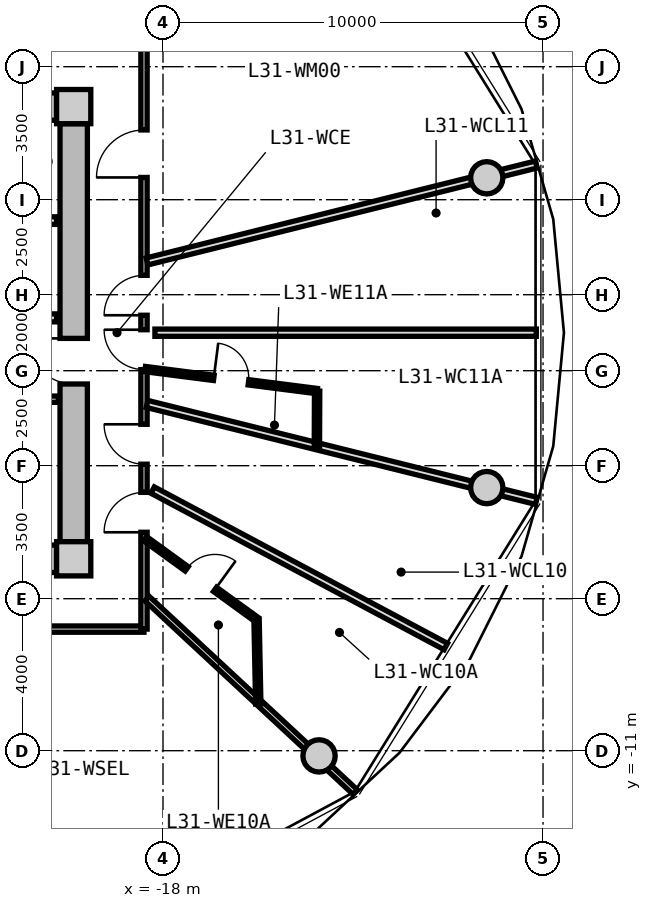
"""IFC4 building model, lengths in metres.
Left out: names, types, materials, properties, quantities, classifications, styles, units other than length and angle.
Written with IfcOpenShell. Run it as: python <this file> out.ifc"""

import sys

from ifc_helpers import new_model, si_unit, direction, frame, frame_2d, origin, origin_2d, place, context, subcontext, project, spatial, rectangle, circle, extrude, source, transform, mapped, element, fill, save


model = new_model("IFC4")
c1 = context("Model", 3, precision=1e-05, world=origin(), true_north=direction((0.0, 1.0)))
c2 = subcontext(c1, "Body", "Model", "MODEL_VIEW")
j1 = project(units=[si_unit("LENGTHUNIT", "METRE"), si_unit("PLANEANGLEUNIT", "RADIAN")], contexts=[c1])
p1 = place(None, origin())
s1 = spatial("IfcSite", under=j1, at=p1, CompositionType="ELEMENT")
p2 = place(p1, origin())
s2 = spatial("IfcBuilding", under=s1, at=p2, CompositionType="ELEMENT")
p3 = place(p2, frame((0.0, 0.0, 102.35)))
s3 = spatial("IfcBuildingStorey", under=s2, at=p3, CompositionType="ELEMENT", Elevation=102.35)
m1 = source(origin(), c2, "Body", "SweptSolid", [
    extrude(rectangle(XDim=0.9, YDim=0.9, at=origin_2d()), origin(), (0.0, 0.0, 1.0), 3.05),
])
for number, where, z_axis, x_axis in (
    (1, (-20.35, -5.95, 0.0), (0.0, 0.0, 1.0), (1.0, 0.0, 0.0)),
    (2, (-20.35, 5.95, 0.0), (0.0, 0.0, 1.0), (1.0, 0.0, 0.0)),
):
    element("IfcColumn", number, at=place(p3, frame(where, z_axis=z_axis, x_axis=x_axis)), inside=s3, PredefinedType="COLUMN", context=c2, shape_type="MappedRepresentation", body=[
        mapped(m1, transform((0.0, 0.0, 0.0), x_axis=(1.0, 0.0, 0.0), y_axis=(0.0, 1.0, 0.0), z_axis=(0.0, 0.0, 1.0), scale=1.0)),
    ])
m2 = source(origin(), c2, "Body", "SweptSolid", [
    extrude(rectangle(XDim=14.4, YDim=0.72, at=frame_2d((7.2, 0.0))), origin(), (0.0, 0.0, 1.0), 2.79),
])
for number, where, z_axis, x_axis in (
    (3, (-35.2, 5.95, 0.0), (0.0, 0.0, 1.0), (1.0, 0.0, 0.0)),
    (4, (-20.8, -5.95, 0.0), (0.0, 0.0, 1.0), (-1.0, 0.0, 0.0)),
):
    element("IfcWall", number, at=place(p3, frame(where, z_axis=z_axis, x_axis=x_axis)), inside=s3, PredefinedType="SHEAR", context=c2, shape_type="MappedRepresentation", body=[
        mapped(m2, transform((0.0, 0.0, 0.0), x_axis=(1.0, 0.0, 0.0), y_axis=(0.0, 1.0, 0.0), z_axis=(0.0, 0.0, 1.0), scale=1.0)),
    ])
m3 = source(origin(), c2, "Body", "SweptSolid", [
    extrude(rectangle(XDim=11.0, YDim=0.72, at=frame_2d((5.5, 0.0))), origin(), (0.0, 0.0, 1.0), 2.79),
])
p4 = place(p3, frame((-20.35, 5.5, 0.0), z_axis=(0.0, 0.0, 1.0), x_axis=(0.0, -1.0, 0.0)))
e5 = element("IfcWall", 5, at=p4, inside=s3, PredefinedType="SHEAR", context=c2, shape_type="MappedRepresentation", body=[
    mapped(m3, transform((0.0, 0.0, 0.0), x_axis=(1.0, 0.0, 0.0), y_axis=(0.0, 1.0, 0.0), z_axis=(0.0, 0.0, 1.0), scale=1.0)),
])
p5 = place(p4, frame((5.65, 0.0, 0.0)))
e6 = element("IfcOpeningElement", 6, at=p5, cuts=e5, PredefinedType="OPENING", context=c2, shape_type="SweptSolid", body=[
    extrude(rectangle(XDim=1.2, YDim=2.15, at=frame_2d((0.6, 1.075))), frame((0.0, 0.37, 0.0), z_axis=(0.0, -1.0, 0.0), x_axis=(1.0, 0.0, 0.0)), (0.0, 0.0, 1.0), 0.74),
])
m4 = source(origin(), c2, "Body", "SweptSolid", [
    extrude(circle(Radius=0.425, at=origin_2d()), origin(), (0.0, 0.0, 1.0), 3.05),
])
for number, where, z_axis, x_axis in (
    (7, (-9.481, 4.076, 0.0), (0.0, 0.0, 1.0), (1.0, 0.0, 0.0)),
    (8, (-13.894, -11.137, 0.0), (0.0, 0.0, 1.0), (1.0, 0.0, 0.0)),
    (9, (-9.481, -4.076, 0.0), (0.0, 0.0, 1.0), (1.0, 0.0, 0.0)),
):
    element("IfcColumn", number, at=place(p3, frame(where, z_axis=z_axis, x_axis=x_axis)), inside=s3, PredefinedType="COLUMN", context=c2, shape_type="MappedRepresentation", body=[
        mapped(m4, transform((0.0, 0.0, 0.0), x_axis=(1.0, 0.0, 0.0), y_axis=(0.0, 1.0, 0.0), z_axis=(0.0, 0.0, 1.0), scale=1.0)),
    ])
m5 = source(origin(), c2, "Body", "SweptSolid", [
    extrude(rectangle(XDim=3.2, YDim=0.2, at=frame_2d((1.6, 0.0))), origin(), (0.0, 0.0, 1.0), 2.775),
])
p6 = place(p3, frame((-24.0, 2.95, 0.0), z_axis=(0.0, 0.0, 1.0), x_axis=(1.0, 0.0, 0.0)))
e10 = element("IfcWall", 10, at=p6, inside=s3, PredefinedType="PARTITIONING", context=c2, shape_type="MappedRepresentation", body=[
    mapped(m5, transform((0.0, 0.0, 0.0), x_axis=(1.0, 0.0, 0.0), y_axis=(0.0, 1.0, 0.0), z_axis=(0.0, 0.0, 1.0), scale=1.0)),
])
m6 = source(origin(), c2, "Body", "SweptSolid", [
    extrude(rectangle(XDim=6.66, YDim=0.21, at=frame_2d((3.33, 0.0))), origin(), (0.0, 0.0, 1.0), 2.775),
])
p7 = place(p3, frame((-27.46, 0.39, 0.0), z_axis=(0.0, 0.0, 1.0), x_axis=(1.0, 0.0, 0.0)))
e11 = element("IfcWall", 11, at=p7, inside=s3, PredefinedType="PARTITIONING", context=c2, shape_type="MappedRepresentation", body=[
    mapped(m6, transform((0.0, 0.0, 0.0), x_axis=(1.0, 0.0, 0.0), y_axis=(0.0, 1.0, 0.0), z_axis=(0.0, 0.0, 1.0), scale=1.0)),
])
p8 = place(p7, frame((1.0, 0.0, 0.0)))
e12 = element("IfcOpeningElement", 12, at=p8, cuts=e11, PredefinedType="OPENING", context=c2, shape_type="SweptSolid", body=[
    extrude(rectangle(XDim=1.2, YDim=2.15, at=frame_2d((0.6, 1.075))), frame((0.0, 0.115, 0.0), z_axis=(0.0, -1.0, 0.0), x_axis=(1.0, 0.0, 0.0)), (0.0, 0.0, 1.0), 0.23),
])
m7 = source(origin(), c2, "Body", "SweptSolid", [
    extrude(rectangle(XDim=2.7, YDim=0.165, at=frame_2d((1.35, 0.0))), origin(), (0.0, 0.0, 1.0), 2.775),
])
p9 = place(p3, frame((-23.45, -1.75, 0.0), z_axis=(0.0, 0.0, 1.0), x_axis=(1.0, 0.0, 0.0)))
e13 = element("IfcWall", 13, at=p9, inside=s3, PredefinedType="PARTITIONING", context=c2, shape_type="MappedRepresentation", body=[
    mapped(m7, transform((0.0, 0.0, 0.0), x_axis=(1.0, 0.0, 0.0), y_axis=(0.0, 1.0, 0.0), z_axis=(0.0, 0.0, 1.0), scale=1.0)),
])
p10 = place(p9, frame((0.85, 0.0, 0.0)))
e14 = element("IfcOpeningElement", 14, at=p10, cuts=e13, PredefinedType="OPENING", context=c2, shape_type="SweptSolid", body=[
    extrude(rectangle(XDim=0.925, YDim=2.1, at=frame_2d((0.462, 1.05))), frame((0.0, 0.093, 0.0), z_axis=(0.0, -1.0, 0.0), x_axis=(1.0, 0.0, 0.0)), (0.0, 0.0, 1.0), 0.185),
])
m8 = source(origin(), c2, "Body", "SweptSolid", [
    extrude(rectangle(XDim=8.6, YDim=0.165, at=frame_2d((4.3, 0.0))), origin(), (0.0, 0.0, 1.0), 2.775),
])
p11 = place(p3, frame((-18.5, -7.8, 0.0), z_axis=(0.0, 0.0, 1.0), x_axis=(-1.0, 0.0, 0.0)))
e15 = element("IfcWall", 15, at=p11, inside=s3, PredefinedType="PARTITIONING", context=c2, shape_type="MappedRepresentation", body=[
    mapped(m8, transform((0.0, 0.0, 0.0), x_axis=(1.0, 0.0, 0.0), y_axis=(0.0, 1.0, 0.0), z_axis=(0.0, 0.0, 1.0), scale=1.0)),
])
p12 = place(p11, frame((3.775, 0.0, 0.0)))
e16 = element("IfcOpeningElement", 16, at=p12, cuts=e15, PredefinedType="OPENING", context=c2, shape_type="SweptSolid", body=[
    extrude(rectangle(XDim=1.05, YDim=2.15, at=frame_2d((0.525, 1.075))), frame((0.0, 0.093, 0.0), z_axis=(0.0, -1.0, 0.0), x_axis=(1.0, 0.0, 0.0)), (0.0, 0.0, 1.0), 0.185),
])
m9 = source(origin(), c2, "Body", "SweptSolid", [
    extrude(rectangle(XDim=15.6, YDim=0.165, at=frame_2d((7.8, 0.0))), origin(), (0.0, 0.0, 1.0), 2.775),
])
p13 = place(p3, frame((-18.5, 7.8, 0.0), z_axis=(0.0, 0.0, 1.0), x_axis=(0.0, -1.0, 0.0)))
e17 = element("IfcWall", 17, at=p13, inside=s3, PredefinedType="PARTITIONING", context=c2, shape_type="MappedRepresentation", body=[
    mapped(m9, transform((0.0, 0.0, 0.0), x_axis=(1.0, 0.0, 0.0), y_axis=(0.0, 1.0, 0.0), z_axis=(0.0, 0.0, 1.0), scale=1.0)),
])
p14 = place(p13, frame((12.002, 0.0, 0.0)))
e18 = element("IfcOpeningElement", 18, at=p14, cuts=e17, PredefinedType="OPENING", context=c2, shape_type="SweptSolid", body=[
    extrude(rectangle(XDim=1.05, YDim=2.15, at=frame_2d((0.525, 1.075))), frame((0.0, 0.093, 0.0), z_axis=(0.0, -1.0, 0.0), x_axis=(1.0, 0.0, 0.0)), (0.0, 0.0, 1.0), 0.185),
])
p15 = place(p13, frame((10.211, 0.0, 0.0)))
e19 = element("IfcOpeningElement", 19, at=p15, cuts=e17, PredefinedType="OPENING", context=c2, shape_type="SweptSolid", body=[
    extrude(rectangle(XDim=1.05, YDim=2.15, at=frame_2d((0.525, 1.075))), frame((0.0, 0.093, 0.0), z_axis=(0.0, -1.0, 0.0), x_axis=(1.0, 0.0, 0.0)), (0.0, 0.0, 1.0), 0.185),
])
p16 = place(p13, frame((7.722, 0.0, 0.0)))
e20 = element("IfcOpeningElement", 20, at=p16, cuts=e17, PredefinedType="OPENING", context=c2, shape_type="SweptSolid", body=[
    extrude(rectangle(XDim=1.05, YDim=2.15, at=frame_2d((0.525, 1.075))), frame((0.0, 0.093, 0.0), z_axis=(0.0, -1.0, 0.0), x_axis=(1.0, 0.0, 0.0)), (0.0, 0.0, 1.0), 0.185),
])
p17 = place(p13, frame((6.291, 0.0, 0.0)))
e21 = element("IfcOpeningElement", 21, at=p17, cuts=e17, PredefinedType="OPENING", context=c2, shape_type="SweptSolid", body=[
    extrude(rectangle(XDim=1.05, YDim=2.15, at=frame_2d((0.525, 1.075))), frame((0.0, 0.093, 0.0), z_axis=(0.0, -1.0, 0.0), x_axis=(1.0, 0.0, 0.0)), (0.0, 0.0, 1.0), 0.185),
])
p18 = place(p13, frame((2.465, 0.0, 0.0)))
e22 = element("IfcOpeningElement", 22, at=p18, cuts=e17, PredefinedType="OPENING", context=c2, shape_type="SweptSolid", body=[
    extrude(rectangle(XDim=1.25, YDim=2.2, at=frame_2d((0.625, 1.1))), frame((0.0, 0.093, 0.0), z_axis=(0.0, -1.0, 0.0), x_axis=(1.0, 0.0, 0.0)), (0.0, 0.0, 1.0), 0.185),
])
m10 = source(origin(), c2, "Body", "SweptSolid", [
    extrude(rectangle(XDim=7.482, YDim=0.165, at=frame_2d((3.741, 0.0))), origin(), (0.0, 0.0, 1.0), 2.275),
])
p19 = place(p3, frame((-18.42, -6.998, 0.0), z_axis=(0.0, 0.0, 1.0), x_axis=(0.732508698043, -0.680757671489, 0.0)))
e23 = element("IfcWall", 23, at=p19, inside=s3, PredefinedType="PARTITIONING", context=c2, shape_type="MappedRepresentation", body=[
    mapped(m10, transform((0.0, 0.0, 0.0), x_axis=(1.0, 0.0, 0.0), y_axis=(0.0, 1.0, 0.0), z_axis=(0.0, 0.0, 1.0), scale=1.0)),
])
m11 = source(origin(), c2, "Body", "SweptSolid", [
    extrude(rectangle(XDim=10.556, YDim=0.19, at=frame_2d((5.278, 0.0))), origin(), (0.0, 0.0, 1.0), 2.275),
])
p20 = place(p3, frame((-18.42, -1.875, 0.0), z_axis=(0.0, 0.0, 1.0), x_axis=(0.970363857851, -0.241648470667, 0.0)))
e24 = element("IfcWall", 24, at=p20, inside=s3, PredefinedType="PARTITIONING", context=c2, shape_type="MappedRepresentation", body=[
    mapped(m11, transform((0.0, 0.0, 0.0), x_axis=(1.0, 0.0, 0.0), y_axis=(0.0, 1.0, 0.0), z_axis=(0.0, 0.0, 1.0), scale=1.0)),
])
m12 = source(origin(), c2, "Body", "SweptSolid", [
    extrude(rectangle(XDim=8.744, YDim=0.19, at=frame_2d((4.372, 0.0))), origin(), (0.0, 0.0, 1.0), 2.775),
])
p21 = place(p3, frame((-18.273, -4.142, 0.0), z_axis=(0.0, 0.0, 1.0), x_axis=(0.882252449936, -0.470776607938, 0.0)))
e25 = element("IfcWall", 25, at=p21, inside=s3, PredefinedType="PARTITIONING", context=c2, shape_type="MappedRepresentation", body=[
    mapped(m12, transform((0.0, 0.0, 0.0), x_axis=(1.0, 0.0, 0.0), y_axis=(0.0, 1.0, 0.0), z_axis=(0.0, 0.0, 1.0), scale=1.0)),
])
m13 = source(origin(), c2, "Body", "SweptSolid", [
    extrude(rectangle(XDim=3.621, YDim=0.14, at=frame_2d((1.811, 0.0))), origin(), (0.0, 0.0, 1.0), 2.775),
])
p22 = place(p3, frame((-18.47, -5.422, 0.0), z_axis=(0.0, 0.0, 1.0), x_axis=(0.80968252222, -0.586868139544, 0.0)))
e26 = element("IfcWall", 26, at=p22, inside=s3, PredefinedType="PARTITIONING", context=c2, shape_type="MappedRepresentation", body=[
    mapped(m13, transform((0.0, 0.0, 0.0), x_axis=(1.0, 0.0, 0.0), y_axis=(0.0, 1.0, 0.0), z_axis=(0.0, 0.0, 1.0), scale=1.0)),
])
p23 = place(p22, frame((1.351, 0.0, 0.0)))
e27 = element("IfcOpeningElement", 27, at=p23, cuts=e26, PredefinedType="OPENING", context=c2, shape_type="SweptSolid", body=[
    extrude(rectangle(XDim=0.92, YDim=2.1, at=frame_2d((0.46, 1.05))), frame((0.0, 0.08, 0.0), z_axis=(0.0, -1.0, 0.0), x_axis=(1.0, 0.0, 0.0)), (0.0, 0.0, 1.0), 0.16),
])
m14 = source(origin(), c2, "Body", "SweptSolid", [
    extrude(rectangle(XDim=2.225, YDim=0.14, at=frame_2d((1.112, 0.0))), origin(), (0.0, 0.0, 1.0), 2.775),
])
p24 = place(p3, frame((-15.538, -7.547, 0.0), z_axis=(0.0, 0.0, 1.0), x_axis=(0.019971869027, -0.999800542332, 0.0)))
e28 = element("IfcWall", 28, at=p24, inside=s3, PredefinedType="PARTITIONING", context=c2, shape_type="MappedRepresentation", body=[
    mapped(m14, transform((0.0, 0.0, 0.0), x_axis=(1.0, 0.0, 0.0), y_axis=(0.0, 1.0, 0.0), z_axis=(0.0, 0.0, 1.0), scale=1.0)),
])
p25 = place(p3, frame((-18.42, 1.875, 0.0), z_axis=(0.0, 0.0, 1.0), x_axis=(0.970363857851, 0.241648470667, 0.0)))
e29 = element("IfcWall", 29, at=p25, inside=s3, PredefinedType="PARTITIONING", context=c2, shape_type="MappedRepresentation", body=[
    mapped(m11, transform((0.0, 0.0, 0.0), x_axis=(1.0, 0.0, 0.0), y_axis=(0.0, 1.0, 0.0), z_axis=(0.0, 0.0, 1.0), scale=1.0)),
])
m15 = source(origin(), c2, "Body", "SweptSolid", [
    extrude(rectangle(XDim=10.036, YDim=0.19, at=frame_2d((5.018, 0.0))), origin(), (0.0, 0.0, 1.0), 2.775),
])
p26 = place(p3, frame((-18.213, 0.0, 0.0), z_axis=(0.0, 0.0, 1.0), x_axis=(1.0, 0.0, 0.0)))
e30 = element("IfcWall", 30, at=p26, inside=s3, PredefinedType="PARTITIONING", context=c2, shape_type="MappedRepresentation", body=[
    mapped(m15, transform((0.0, 0.0, 0.0), x_axis=(1.0, 0.0, 0.0), y_axis=(0.0, 1.0, 0.0), z_axis=(0.0, 0.0, 1.0), scale=1.0)),
])
m16 = source(origin(), c2, "Body", "SweptSolid", [
    extrude(rectangle(XDim=4.562, YDim=0.14, at=frame_2d((2.281, 0.0))), origin(), (0.0, 0.0, 1.0), 2.775),
])
p27 = place(p3, frame((-18.47, -0.958, 0.0), z_axis=(0.0, 0.0, 1.0), x_axis=(0.991904666356, -0.126984774129, 0.0)))
e31 = element("IfcWall", 31, at=p27, inside=s3, PredefinedType="PARTITIONING", context=c2, shape_type="MappedRepresentation", body=[
    mapped(m16, transform((0.0, 0.0, 0.0), x_axis=(1.0, 0.0, 0.0), y_axis=(0.0, 1.0, 0.0), z_axis=(0.0, 0.0, 1.0), scale=1.0)),
])
p28 = place(p27, frame((1.821, 0.0, 0.0)))
e32 = element("IfcOpeningElement", 32, at=p28, cuts=e31, PredefinedType="OPENING", context=c2, shape_type="SweptSolid", body=[
    extrude(rectangle(XDim=0.92, YDim=2.1, at=frame_2d((0.46, 1.05))), frame((0.0, 0.08, 0.0), z_axis=(0.0, -1.0, 0.0), x_axis=(1.0, 0.0, 0.0)), (0.0, 0.0, 1.0), 0.16),
])
m17 = source(origin(), c2, "Body", "SweptSolid", [
    extrude(rectangle(XDim=1.468, YDim=0.14, at=frame_2d((0.734, 0.0))), origin(), (0.0, 0.0, 1.0), 2.775),
])
p29 = place(p3, frame((-13.945, -1.537, 0.0), z_axis=(0.0, 0.0, 1.0), x_axis=(-0.00399198416, -0.999992031999, 0.0)))
e33 = element("IfcWall", 33, at=p29, inside=s3, PredefinedType="PARTITIONING", context=c2, shape_type="MappedRepresentation", body=[
    mapped(m17, transform((0.0, 0.0, 0.0), x_axis=(1.0, 0.0, 0.0), y_axis=(0.0, 1.0, 0.0), z_axis=(0.0, 0.0, 1.0), scale=1.0)),
])
m18 = source(origin(), c2, "Body", "SweptSolid", [
    extrude(rectangle(XDim=1.2, YDim=2.15, at=frame_2d((0.6, 1.075))), frame((0.0, 0.025, 0.0), z_axis=(0.0, -1.0, 0.0), x_axis=(1.0, 0.0, 0.0)), (0.0, 0.0, 1.0), 0.05),
])
p30 = place(p5, frame((1.2, 0.0, 0.0), z_axis=(0.0, 0.0, 1.0), x_axis=(-1.0, 0.0, 0.0)))
e34 = element("IfcDoor", 34, at=p30, inside=s3, OperationType="SINGLE_SWING_RIGHT", PredefinedType="DOOR", context=c2, shape_type="MappedRepresentation", body=[
    mapped(m18, transform((0.0, 0.0, 0.0), x_axis=(1.0, 0.0, 0.0), y_axis=(0.0, 1.0, 0.0), z_axis=(0.0, 0.0, 1.0), scale=1.0)),
])
fill(e6, e34)
m19 = source(origin(), c2, "Body", "SweptSolid", [
    extrude(rectangle(XDim=1.05, YDim=2.15, at=frame_2d((0.525, 1.075))), frame((0.0, 0.025, 0.0), z_axis=(0.0, -1.0, 0.0), x_axis=(1.0, 0.0, 0.0)), (0.0, 0.0, 1.0), 0.05),
])
p31 = place(p14, frame((1.05, 0.0, 0.0), z_axis=(0.0, 0.0, 1.0), x_axis=(-1.0, 0.0, 0.0)))
e35 = element("IfcDoor", 35, at=p31, inside=s3, OperationType="SINGLE_SWING_LEFT", PredefinedType="DOOR", context=c2, shape_type="MappedRepresentation", body=[
    mapped(m19, transform((0.0, 0.0, 0.0), x_axis=(1.0, 0.0, 0.0), y_axis=(0.0, 1.0, 0.0), z_axis=(0.0, 0.0, 1.0), scale=1.0)),
])
fill(e18, e35)
m20 = source(origin(), c2, "Body", "SweptSolid", [
    extrude(rectangle(XDim=0.92, YDim=2.1, at=frame_2d((0.46, 1.05))), frame((0.0, 0.025, 0.0), z_axis=(0.0, -1.0, 0.0), x_axis=(1.0, 0.0, 0.0)), (0.0, 0.0, 1.0), 0.05),
])
p32 = place(p23, origin())
e36 = element("IfcDoor", 36, at=p32, inside=s3, OperationType="SINGLE_SWING_RIGHT", PredefinedType="DOOR", context=c2, shape_type="MappedRepresentation", body=[
    mapped(m20, transform((0.0, 0.0, 0.0), x_axis=(1.0, 0.0, 0.0), y_axis=(0.0, 1.0, 0.0), z_axis=(0.0, 0.0, 1.0), scale=1.0)),
])
fill(e27, e36)
p33 = place(p15, frame((1.05, 0.0, 0.0), z_axis=(0.0, 0.0, 1.0), x_axis=(-1.0, 0.0, 0.0)))
e37 = element("IfcDoor", 37, at=p33, inside=s3, OperationType="SINGLE_SWING_RIGHT", PredefinedType="DOOR", context=c2, shape_type="MappedRepresentation", body=[
    mapped(m19, transform((0.0, 0.0, 0.0), x_axis=(1.0, 0.0, 0.0), y_axis=(0.0, 1.0, 0.0), z_axis=(0.0, 0.0, 1.0), scale=1.0)),
])
fill(e19, e37)
p34 = place(p16, frame((1.05, 0.0, 0.0), z_axis=(0.0, 0.0, 1.0), x_axis=(-1.0, 0.0, 0.0)))
e38 = element("IfcDoor", 38, at=p34, inside=s3, OperationType="SINGLE_SWING_RIGHT", PredefinedType="DOOR", context=c2, shape_type="MappedRepresentation", body=[
    mapped(m19, transform((0.0, 0.0, 0.0), x_axis=(1.0, 0.0, 0.0), y_axis=(0.0, 1.0, 0.0), z_axis=(0.0, 0.0, 1.0), scale=1.0)),
])
fill(e20, e38)
p35 = place(p28, origin())
e39 = element("IfcDoor", 39, at=p35, inside=s3, OperationType="SINGLE_SWING_LEFT", PredefinedType="DOOR", context=c2, shape_type="MappedRepresentation", body=[
    mapped(m20, transform((0.0, 0.0, 0.0), x_axis=(1.0, 0.0, 0.0), y_axis=(0.0, 1.0, 0.0), z_axis=(0.0, 0.0, 1.0), scale=1.0)),
])
fill(e32, e39)
p36 = place(p17, frame((1.05, 0.0, 0.0), z_axis=(0.0, 0.0, 1.0), x_axis=(-1.0, 0.0, 0.0)))
e40 = element("IfcDoor", 40, at=p36, inside=s3, OperationType="SINGLE_SWING_LEFT", PredefinedType="DOOR", context=c2, shape_type="MappedRepresentation", body=[
    mapped(m19, transform((0.0, 0.0, 0.0), x_axis=(1.0, 0.0, 0.0), y_axis=(0.0, 1.0, 0.0), z_axis=(0.0, 0.0, 1.0), scale=1.0)),
])
fill(e21, e40)
m21 = source(origin(), c2, "Body", "SweptSolid", [
    extrude(rectangle(XDim=1.25, YDim=2.2, at=frame_2d((0.625, 1.1))), frame((0.0, 0.025, 0.0), z_axis=(0.0, -1.0, 0.0), x_axis=(1.0, 0.0, 0.0)), (0.0, 0.0, 1.0), 0.05),
])
p37 = place(p18, frame((1.25, 0.0, 0.0), z_axis=(0.0, 0.0, 1.0), x_axis=(-1.0, 0.0, 0.0)))
e41 = element("IfcDoor", 41, at=p37, inside=s3, OperationType="SINGLE_SWING_LEFT", PredefinedType="DOOR", context=c2, shape_type="MappedRepresentation", body=[
    mapped(m21, transform((0.0, 0.0, 0.0), x_axis=(1.0, 0.0, 0.0), y_axis=(0.0, 1.0, 0.0), z_axis=(0.0, 0.0, 1.0), scale=1.0)),
])
fill(e22, e41)
save(model, sys.argv[1])
